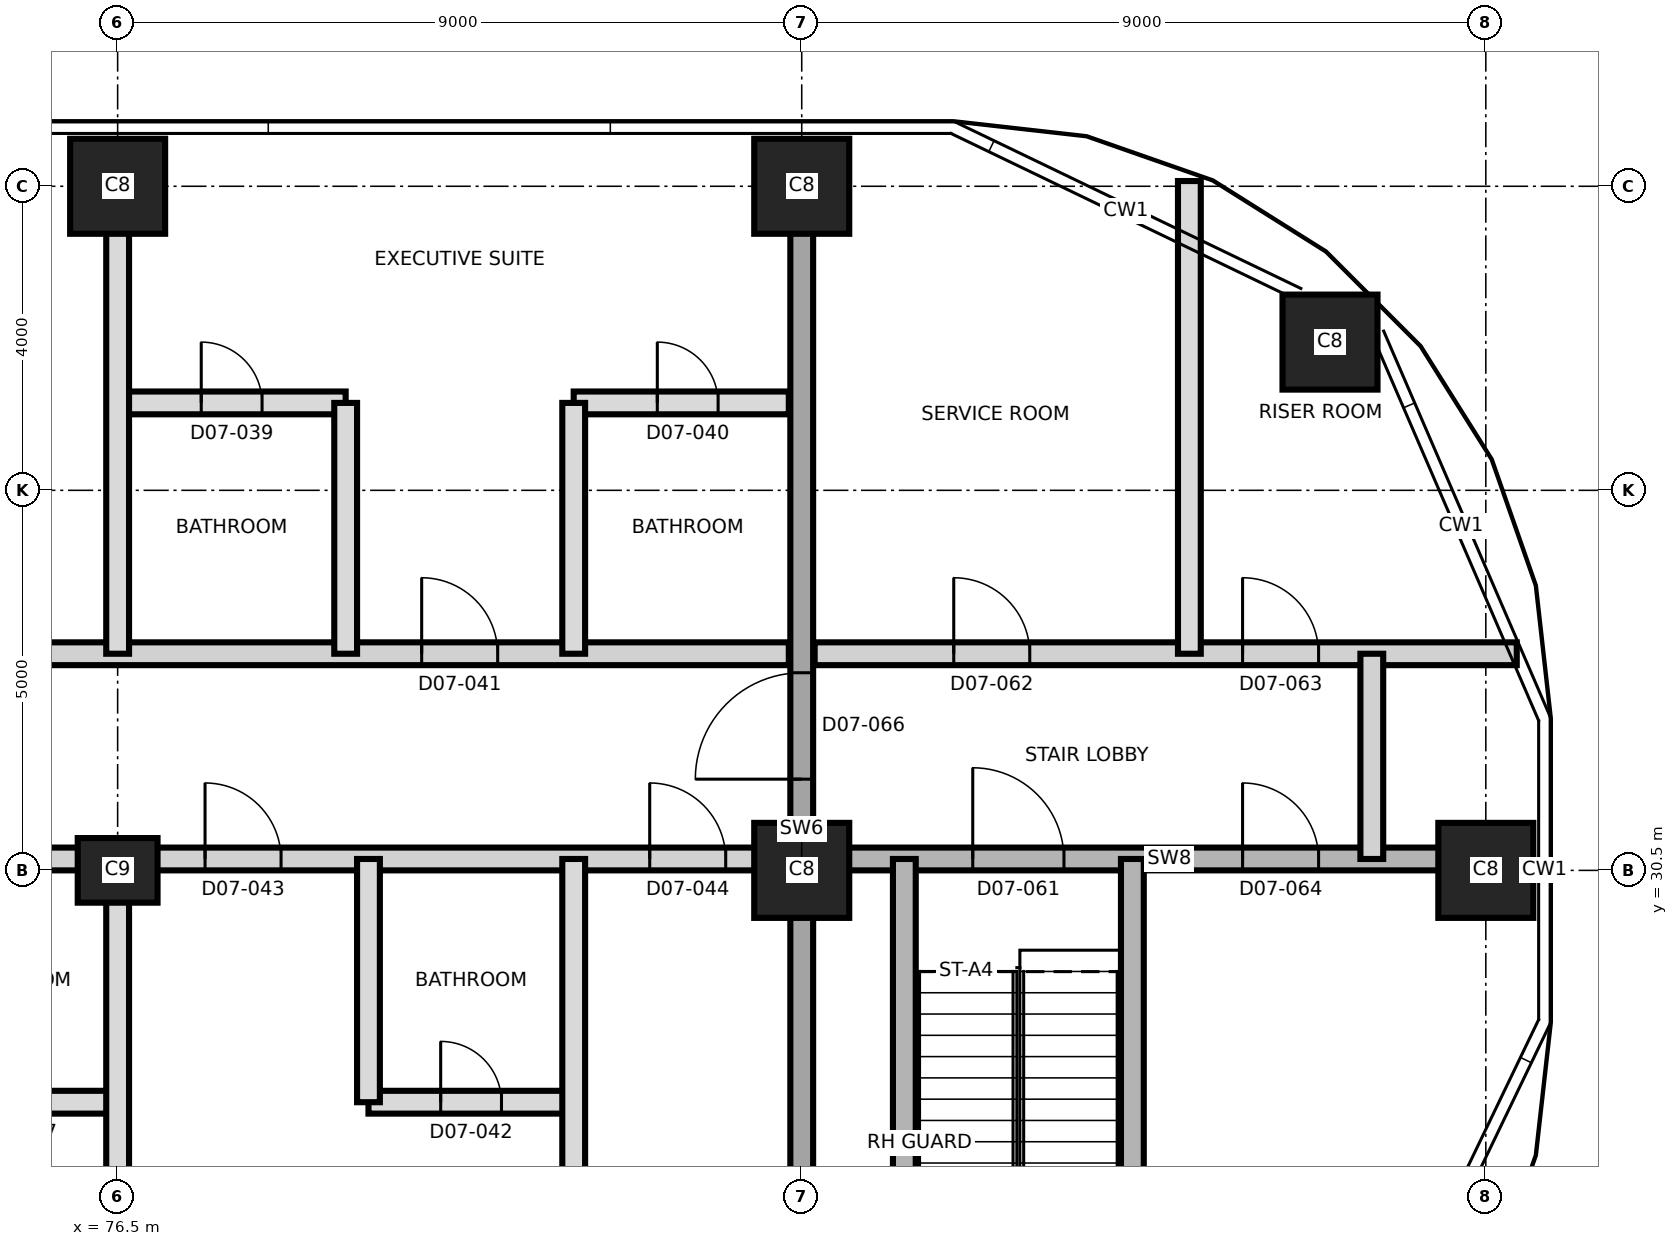
"""IFC4 building model, lengths in metres.
Left out: names, types, materials, properties, quantities, classifications, styles, units other than length and angle.
Written with IfcOpenShell. Run it as: python <this file> out.ifc"""

import sys

from ifc_helpers import new_model, si_unit, direction, frame, frame_2d, origin, origin_2d, place, context, subcontext, project, spatial, rectangle, extrude, element, fill, save


model = new_model("IFC4")
c1 = context("Model", 3, precision=1e-05, world=origin(), true_north=direction((0.0, 1.0)))
c2 = subcontext(c1, "Body", "Model", "MODEL_VIEW")
j1 = project(units=[si_unit("LENGTHUNIT", "METRE"), si_unit("PLANEANGLEUNIT", "RADIAN")], contexts=[c1])
p1 = place(None, origin())
s1 = spatial("IfcSite", under=j1, at=p1, CompositionType="ELEMENT")
p2 = place(p1, origin())
s2 = spatial("IfcBuilding", under=s1, at=p2, CompositionType="ELEMENT")
p3 = place(p2, frame((0.0, 0.0, 87.1)))
s3 = spatial("IfcBuildingStorey", under=s2, at=p3, CompositionType="ELEMENT", Elevation=87.1)
p4 = place(p3, frame((76.5, 30.5, 0.0), z_axis=(0.0, 0.0, 1.0), x_axis=(1.0, 0.0, 0.0)))
e1 = element("IfcColumn", 1, at=p4, inside=s3, PredefinedType="COLUMN", context=c2, shape_type="SweptSolid", body=[
    extrude(rectangle(XDim=1.05, YDim=0.85, at=origin_2d()), origin(), (0.0, 0.0, 1.0), 3.7),
])
for number, where, z_axis, x_axis in (
    (2, (85.5, 30.5, 0.0), (0.0, 0.0, 1.0), (1.0, 0.0, 0.0)),
    (3, (94.5, 30.5, 0.0), (0.0, 0.0, 1.0), (1.0, 0.0, 0.0)),
    (4, (92.45, 37.45, 0.0), (0.0, 0.0, 1.0), (1.0, 0.0, 0.0)),
    (5, (76.5, 39.5, 0.0), (0.0, 0.0, 1.0), (1.0, 0.0, 0.0)),
    (6, (85.5, 39.5, 0.0), (0.0, 0.0, 1.0), (1.0, 0.0, 0.0)),
):
    element("IfcColumn", number, at=place(p3, frame(where, z_axis=z_axis, x_axis=x_axis)), inside=s3, PredefinedType="COLUMN", context=c2, shape_type="SweptSolid", body=[
        extrude(rectangle(XDim=1.25, YDim=1.25, at=origin_2d()), origin(), (0.0, 0.0, 1.0), 3.7),
    ])
p5 = place(p3, frame((85.5, 20.995, 0.0), z_axis=(0.0, 0.0, 1.0), x_axis=(0.0, 1.0, 0.0)))
e7 = element("IfcWall", 7, at=p5, inside=s3, PredefinedType="SHEAR", context=c2, shape_type="SweptSolid", body=[
    extrude(rectangle(XDim=19.01, YDim=0.3, at=frame_2d((9.505, 0.0))), origin(), (0.0, 0.0, 1.0), 3.7),
])
p6 = place(p5, frame((10.705, 0.0, 0.0)))
e8 = element("IfcOpeningElement", 8, at=p6, cuts=e7, PredefinedType="OPENING", context=c2, shape_type="SweptSolid", body=[
    extrude(rectangle(XDim=1.4, YDim=2.1, at=frame_2d((0.7, 1.05))), frame((0.0, 0.16, 0.0), z_axis=(0.0, -1.0, 0.0), x_axis=(1.0, 0.0, 0.0)), (0.0, 0.0, 1.0), 0.32),
])
p7 = place(p3, frame((73.8, 27.45, 0.0), z_axis=(0.0, 0.0, 1.0), x_axis=(1.0, 0.0, 0.0)))
e9 = element("IfcWall", 9, at=p7, inside=s3, PredefinedType="PARTITIONING", context=c2, shape_type="SweptSolid", body=[
    extrude(rectangle(XDim=2.7, YDim=0.3, at=frame_2d((1.35, 0.0))), origin(), (0.0, 0.0, 1.0), 3.4),
])
p8 = place(p7, frame((0.95, 0.0, 0.0)))
e10 = element("IfcOpeningElement", 10, at=p8, cuts=e9, PredefinedType="OPENING", context=c2, shape_type="SweptSolid", body=[
    extrude(rectangle(XDim=0.8, YDim=2.1, at=frame_2d((0.4, 1.05))), frame((0.0, 0.16, 0.0), z_axis=(0.0, -1.0, 0.0), x_axis=(1.0, 0.0, 0.0)), (0.0, 0.0, 1.0), 0.32),
])
p9 = place(p3, frame((79.8, 27.45, 0.0), z_axis=(0.0, 0.0, 1.0), x_axis=(1.0, 0.0, 0.0)))
e11 = element("IfcWall", 11, at=p9, inside=s3, PredefinedType="PARTITIONING", context=c2, shape_type="SweptSolid", body=[
    extrude(rectangle(XDim=2.7, YDim=0.3, at=frame_2d((1.35, 0.0))), origin(), (0.0, 0.0, 1.0), 3.4),
])
p10 = place(p9, frame((0.95, 0.0, 0.0)))
e12 = element("IfcOpeningElement", 12, at=p10, cuts=e11, PredefinedType="OPENING", context=c2, shape_type="SweptSolid", body=[
    extrude(rectangle(XDim=0.8, YDim=2.1, at=frame_2d((0.4, 1.05))), frame((0.0, 0.16, 0.0), z_axis=(0.0, -1.0, 0.0), x_axis=(1.0, 0.0, 0.0)), (0.0, 0.0, 1.0), 0.32),
])
p11 = place(p3, frame((58.8, 30.65, 0.0), z_axis=(0.0, 0.0, 1.0), x_axis=(1.0, 0.0, 0.0)))
e13 = element("IfcWall", 13, at=p11, inside=s3, PredefinedType="PARTITIONING", context=c2, shape_type="SweptSolid", body=[
    extrude(rectangle(XDim=26.53, YDim=0.3, at=frame_2d((13.265, 0.0))), origin(), (0.0, 0.0, 1.0), 3.4),
])
p12 = place(p11, frame((3.7, 0.0, 0.0)))
e14 = element("IfcOpeningElement", 14, at=p12, cuts=e13, PredefinedType="OPENING", context=c2, shape_type="SweptSolid", body=[
    extrude(rectangle(XDim=1.0, YDim=2.4, at=frame_2d((0.5, 1.2))), frame((0.0, 0.16, 0.0), z_axis=(0.0, -1.0, 0.0), x_axis=(1.0, 0.0, 0.0)), (0.0, 0.0, 1.0), 0.32),
])
p13 = place(p11, frame((11.8, 0.0, 0.0)))
e15 = element("IfcOpeningElement", 15, at=p13, cuts=e13, PredefinedType="OPENING", context=c2, shape_type="SweptSolid", body=[
    extrude(rectangle(XDim=1.0, YDim=2.1, at=frame_2d((0.5, 1.05))), frame((0.0, 0.16, 0.0), z_axis=(0.0, -1.0, 0.0), x_axis=(1.0, 0.0, 0.0)), (0.0, 0.0, 1.0), 0.32),
])
p14 = place(p11, frame((13.6, 0.0, 0.0)))
e16 = element("IfcOpeningElement", 16, at=p14, cuts=e13, PredefinedType="OPENING", context=c2, shape_type="SweptSolid", body=[
    extrude(rectangle(XDim=1.0, YDim=2.1, at=frame_2d((0.5, 1.05))), frame((0.0, 0.16, 0.0), z_axis=(0.0, -1.0, 0.0), x_axis=(1.0, 0.0, 0.0)), (0.0, 0.0, 1.0), 0.32),
])
p15 = place(p11, frame((18.85, 0.0, 0.0)))
e17 = element("IfcOpeningElement", 17, at=p15, cuts=e13, PredefinedType="OPENING", context=c2, shape_type="SweptSolid", body=[
    extrude(rectangle(XDim=1.0, YDim=2.1, at=frame_2d((0.5, 1.05))), frame((0.0, 0.16, 0.0), z_axis=(0.0, -1.0, 0.0), x_axis=(1.0, 0.0, 0.0)), (0.0, 0.0, 1.0), 0.32),
])
p16 = place(p11, frame((24.7, 0.0, 0.0)))
e18 = element("IfcOpeningElement", 18, at=p16, cuts=e13, PredefinedType="OPENING", context=c2, shape_type="SweptSolid", body=[
    extrude(rectangle(XDim=1.0, YDim=2.1, at=frame_2d((0.5, 1.05))), frame((0.0, 0.16, 0.0), z_axis=(0.0, -1.0, 0.0), x_axis=(1.0, 0.0, 0.0)), (0.0, 0.0, 1.0), 0.32),
])
p17 = place(p3, frame((85.67, 30.65, 0.0), z_axis=(0.0, 0.0, 1.0), x_axis=(1.0, 0.0, 0.0)))
e19 = element("IfcWall", 19, at=p17, inside=s3, PredefinedType="SHEAR", context=c2, shape_type="SweptSolid", body=[
    extrude(rectangle(XDim=9.335, YDim=0.3, at=frame_2d((4.667, 0.0))), origin(), (0.0, 0.0, 1.0), 3.4),
])
p18 = place(p17, frame((2.08, 0.0, 0.0)))
e20 = element("IfcOpeningElement", 20, at=p18, cuts=e19, PredefinedType="OPENING", context=c2, shape_type="SweptSolid", body=[
    extrude(rectangle(XDim=1.2, YDim=2.1, at=frame_2d((0.6, 1.05))), frame((0.0, 0.16, 0.0), z_axis=(0.0, -1.0, 0.0), x_axis=(1.0, 0.0, 0.0)), (0.0, 0.0, 1.0), 0.32),
])
p19 = place(p17, frame((5.63, 0.0, 0.0)))
e21 = element("IfcOpeningElement", 21, at=p19, cuts=e19, PredefinedType="OPENING", context=c2, shape_type="SweptSolid", body=[
    extrude(rectangle(XDim=1.0, YDim=2.1, at=frame_2d((0.5, 1.05))), frame((0.0, 0.16, 0.0), z_axis=(0.0, -1.0, 0.0), x_axis=(1.0, 0.0, 0.0)), (0.0, 0.0, 1.0), 0.32),
])
p20 = place(p3, frame((58.8, 33.35, 0.0), z_axis=(0.0, 0.0, 1.0), x_axis=(1.0, 0.0, 0.0)))
e22 = element("IfcWall", 22, at=p20, inside=s3, PredefinedType="PARTITIONING", context=c2, shape_type="SweptSolid", body=[
    extrude(rectangle(XDim=26.53, YDim=0.3, at=frame_2d((13.265, 0.0))), origin(), (0.0, 0.0, 1.0), 3.4),
])
p21 = place(p20, frame((3.7, 0.0, 0.0)))
e23 = element("IfcOpeningElement", 23, at=p21, cuts=e22, PredefinedType="OPENING", context=c2, shape_type="SweptSolid", body=[
    extrude(rectangle(XDim=1.0, YDim=2.4, at=frame_2d((0.5, 1.2))), frame((0.0, 0.16, 0.0), z_axis=(0.0, -1.0, 0.0), x_axis=(1.0, 0.0, 0.0)), (0.0, 0.0, 1.0), 0.32),
])
p22 = place(p20, frame((9.85, 0.0, 0.0)))
e24 = element("IfcOpeningElement", 24, at=p22, cuts=e22, PredefinedType="OPENING", context=c2, shape_type="SweptSolid", body=[
    extrude(rectangle(XDim=1.0, YDim=2.1, at=frame_2d((0.5, 1.05))), frame((0.0, 0.16, 0.0), z_axis=(0.0, -1.0, 0.0), x_axis=(1.0, 0.0, 0.0)), (0.0, 0.0, 1.0), 0.32),
])
p23 = place(p20, frame((15.7, 0.0, 0.0)))
e25 = element("IfcOpeningElement", 25, at=p23, cuts=e22, PredefinedType="OPENING", context=c2, shape_type="SweptSolid", body=[
    extrude(rectangle(XDim=1.0, YDim=2.1, at=frame_2d((0.5, 1.05))), frame((0.0, 0.16, 0.0), z_axis=(0.0, -1.0, 0.0), x_axis=(1.0, 0.0, 0.0)), (0.0, 0.0, 1.0), 0.32),
])
p24 = place(p20, frame((21.7, 0.0, 0.0)))
e26 = element("IfcOpeningElement", 26, at=p24, cuts=e22, PredefinedType="OPENING", context=c2, shape_type="SweptSolid", body=[
    extrude(rectangle(XDim=1.0, YDim=2.4, at=frame_2d((0.5, 1.2))), frame((0.0, 0.16, 0.0), z_axis=(0.0, -1.0, 0.0), x_axis=(1.0, 0.0, 0.0)), (0.0, 0.0, 1.0), 0.32),
])
p25 = place(p3, frame((85.67, 33.35, 0.0), z_axis=(0.0, 0.0, 1.0), x_axis=(1.0, 0.0, 0.0)))
e27 = element("IfcWall", 27, at=p25, inside=s3, PredefinedType="PARTITIONING", context=c2, shape_type="SweptSolid", body=[
    extrude(rectangle(XDim=9.237, YDim=0.3, at=frame_2d((4.619, 0.0))), origin(), (0.0, 0.0, 1.0), 3.4),
])
p26 = place(p25, frame((1.83, 0.0, 0.0)))
e28 = element("IfcOpeningElement", 28, at=p26, cuts=e27, PredefinedType="OPENING", context=c2, shape_type="SweptSolid", body=[
    extrude(rectangle(XDim=1.0, YDim=2.1, at=frame_2d((0.5, 1.05))), frame((0.0, 0.16, 0.0), z_axis=(0.0, -1.0, 0.0), x_axis=(1.0, 0.0, 0.0)), (0.0, 0.0, 1.0), 0.32),
])
p27 = place(p25, frame((5.63, 0.0, 0.0)))
e29 = element("IfcOpeningElement", 29, at=p27, cuts=e27, PredefinedType="OPENING", context=c2, shape_type="SweptSolid", body=[
    extrude(rectangle(XDim=1.0, YDim=2.1, at=frame_2d((0.5, 1.05))), frame((0.0, 0.16, 0.0), z_axis=(0.0, -1.0, 0.0), x_axis=(1.0, 0.0, 0.0)), (0.0, 0.0, 1.0), 0.32),
])
p28 = place(p3, frame((76.5, 36.65, 0.0), z_axis=(0.0, 0.0, 1.0), x_axis=(1.0, 0.0, 0.0)))
e30 = element("IfcWall", 30, at=p28, inside=s3, PredefinedType="PARTITIONING", context=c2, shape_type="SweptSolid", body=[
    extrude(rectangle(XDim=3.0, YDim=0.3, at=frame_2d((1.5, 0.0))), origin(), (0.0, 0.0, 1.0), 3.4),
])
p29 = place(p28, frame((1.1, 0.0, 0.0)))
e31 = element("IfcOpeningElement", 31, at=p29, cuts=e30, PredefinedType="OPENING", context=c2, shape_type="SweptSolid", body=[
    extrude(rectangle(XDim=0.8, YDim=2.1, at=frame_2d((0.4, 1.05))), frame((0.0, 0.16, 0.0), z_axis=(0.0, -1.0, 0.0), x_axis=(1.0, 0.0, 0.0)), (0.0, 0.0, 1.0), 0.32),
])
p30 = place(p3, frame((82.5, 36.65, 0.0), z_axis=(0.0, 0.0, 1.0), x_axis=(1.0, 0.0, 0.0)))
e32 = element("IfcWall", 32, at=p30, inside=s3, PredefinedType="PARTITIONING", context=c2, shape_type="SweptSolid", body=[
    extrude(rectangle(XDim=2.83, YDim=0.3, at=frame_2d((1.415, 0.0))), origin(), (0.0, 0.0, 1.0), 3.4),
])
p31 = place(p30, frame((1.1, 0.0, 0.0)))
e33 = element("IfcOpeningElement", 33, at=p31, cuts=e32, PredefinedType="OPENING", context=c2, shape_type="SweptSolid", body=[
    extrude(rectangle(XDim=0.8, YDim=2.1, at=frame_2d((0.4, 1.05))), frame((0.0, 0.16, 0.0), z_axis=(0.0, -1.0, 0.0), x_axis=(1.0, 0.0, 0.0)), (0.0, 0.0, 1.0), 0.32),
])
p32 = place(p3, frame((76.5, 20.995, 0.0), z_axis=(0.0, 0.0, 1.0), x_axis=(0.0, 1.0, 0.0)))
e34 = element("IfcWall", 34, at=p32, inside=s3, PredefinedType="PARTITIONING", context=c2, shape_type="SweptSolid", body=[
    extrude(rectangle(XDim=9.655, YDim=0.3, at=frame_2d((4.827, 0.0))), origin(), (0.0, 0.0, 1.0), 3.4),
])
p33 = place(p3, frame((76.5, 33.35, 0.0), z_axis=(0.0, 0.0, 1.0), x_axis=(0.0, 1.0, 0.0)))
e35 = element("IfcWall", 35, at=p33, inside=s3, PredefinedType="PARTITIONING", context=c2, shape_type="SweptSolid", body=[
    extrude(rectangle(XDim=6.655, YDim=0.3, at=frame_2d((3.327, 0.0))), origin(), (0.0, 0.0, 1.0), 3.4),
])
p34 = place(p3, frame((79.5, 33.35, 0.0), z_axis=(0.0, 0.0, 1.0), x_axis=(0.0, 1.0, 0.0)))
e36 = element("IfcWall", 36, at=p34, inside=s3, PredefinedType="PARTITIONING", context=c2, shape_type="SweptSolid", body=[
    extrude(rectangle(XDim=3.3, YDim=0.3, at=frame_2d((1.65, 0.0))), origin(), (0.0, 0.0, 1.0), 3.4),
])
p35 = place(p3, frame((79.8, 27.45, 0.0), z_axis=(0.0, 0.0, 1.0), x_axis=(0.0, 1.0, 0.0)))
e37 = element("IfcWall", 37, at=p35, inside=s3, PredefinedType="PARTITIONING", context=c2, shape_type="SweptSolid", body=[
    extrude(rectangle(XDim=3.2, YDim=0.3, at=frame_2d((1.6, 0.0))), origin(), (0.0, 0.0, 1.0), 3.4),
])
p36 = place(p3, frame((82.5, 20.995, 0.0), z_axis=(0.0, 0.0, 1.0), x_axis=(0.0, 1.0, 0.0)))
e38 = element("IfcWall", 38, at=p36, inside=s3, PredefinedType="PARTITIONING", context=c2, shape_type="SweptSolid", body=[
    extrude(rectangle(XDim=9.655, YDim=0.3, at=frame_2d((4.827, 0.0))), origin(), (0.0, 0.0, 1.0), 3.4),
])
p37 = place(p3, frame((82.5, 33.35, 0.0), z_axis=(0.0, 0.0, 1.0), x_axis=(0.0, 1.0, 0.0)))
e39 = element("IfcWall", 39, at=p37, inside=s3, PredefinedType="PARTITIONING", context=c2, shape_type="SweptSolid", body=[
    extrude(rectangle(XDim=3.3, YDim=0.3, at=frame_2d((1.65, 0.0))), origin(), (0.0, 0.0, 1.0), 3.4),
])
for number, where, z_axis, x_axis in (
    (40, (86.85, 21.8, 0.0), (0.0, 0.0, 1.0), (0.0, 1.0, 0.0)),
    (41, (89.85, 21.8, 0.0), (0.0, 0.0, 1.0), (0.0, 1.0, 0.0)),
):
    element("IfcWall", number, at=place(p3, frame(where, z_axis=z_axis, x_axis=x_axis)), inside=s3, PredefinedType="SHEAR", context=c2, shape_type="SweptSolid", body=[
        extrude(rectangle(XDim=8.85, YDim=0.3, at=frame_2d((4.425, 0.0))), origin(), (0.0, 0.0, 1.0), 3.4),
    ])
p38 = place(p3, frame((90.6, 33.35, 0.0), z_axis=(0.0, 0.0, 1.0), x_axis=(0.0, 1.0, 0.0)))
e42 = element("IfcWall", 42, at=p38, inside=s3, PredefinedType="PARTITIONING", context=c2, shape_type="SweptSolid", body=[
    extrude(rectangle(XDim=6.219, YDim=0.3, at=frame_2d((3.109, 0.0))), origin(), (0.0, 0.0, 1.0), 3.4),
])
p39 = place(p3, frame((93.0, 30.65, 0.0), z_axis=(0.0, 0.0, 1.0), x_axis=(0.0, 1.0, 0.0)))
e43 = element("IfcWall", 43, at=p39, inside=s3, PredefinedType="PARTITIONING", context=c2, shape_type="SweptSolid", body=[
    extrude(rectangle(XDim=2.7, YDim=0.3, at=frame_2d((1.35, 0.0))), origin(), (0.0, 0.0, 1.0), 3.4),
])
p40 = place(p29, origin())
e44 = element("IfcDoor", 44, at=p40, inside=s3, OperationType="SINGLE_SWING_RIGHT", PredefinedType="DOOR", context=c2, shape_type="SweptSolid", body=[
    extrude(rectangle(XDim=0.8, YDim=2.1, at=frame_2d((0.4, 1.05))), frame((0.0, 0.025, 0.0), z_axis=(0.0, -1.0, 0.0), x_axis=(1.0, 0.0, 0.0)), (0.0, 0.0, 1.0), 0.05),
])
fill(e31, e44)
p41 = place(p31, origin())
e45 = element("IfcDoor", 45, at=p41, inside=s3, OperationType="SINGLE_SWING_LEFT", PredefinedType="DOOR", context=c2, shape_type="SweptSolid", body=[
    extrude(rectangle(XDim=0.8, YDim=2.1, at=frame_2d((0.4, 1.05))), frame((0.0, 0.025, 0.0), z_axis=(0.0, -1.0, 0.0), x_axis=(1.0, 0.0, 0.0)), (0.0, 0.0, 1.0), 0.05),
])
fill(e33, e45)
p42 = place(p24, origin())
e46 = element("IfcDoor", 46, at=p42, inside=s3, OperationType="SINGLE_SWING_LEFT", PredefinedType="DOOR", context=c2, shape_type="SweptSolid", body=[
    extrude(rectangle(XDim=1.0, YDim=2.4, at=frame_2d((0.5, 1.2))), frame((0.0, 0.025, 0.0), z_axis=(0.0, -1.0, 0.0), x_axis=(1.0, 0.0, 0.0)), (0.0, 0.0, 1.0), 0.05),
])
fill(e26, e46)
p43 = place(p10, origin())
e47 = element("IfcDoor", 47, at=p43, inside=s3, OperationType="SINGLE_SWING_RIGHT", PredefinedType="DOOR", context=c2, shape_type="SweptSolid", body=[
    extrude(rectangle(XDim=0.8, YDim=2.1, at=frame_2d((0.4, 1.05))), frame((0.0, 0.025, 0.0), z_axis=(0.0, -1.0, 0.0), x_axis=(1.0, 0.0, 0.0)), (0.0, 0.0, 1.0), 0.05),
])
fill(e12, e47)
p44 = place(p15, origin())
e48 = element("IfcDoor", 48, at=p44, inside=s3, OperationType="SINGLE_SWING_LEFT", PredefinedType="DOOR", context=c2, shape_type="SweptSolid", body=[
    extrude(rectangle(XDim=1.0, YDim=2.1, at=frame_2d((0.5, 1.05))), frame((0.0, 0.025, 0.0), z_axis=(0.0, -1.0, 0.0), x_axis=(1.0, 0.0, 0.0)), (0.0, 0.0, 1.0), 0.05),
])
fill(e17, e48)
p45 = place(p16, origin())
e49 = element("IfcDoor", 49, at=p45, inside=s3, OperationType="SINGLE_SWING_LEFT", PredefinedType="DOOR", context=c2, shape_type="SweptSolid", body=[
    extrude(rectangle(XDim=1.0, YDim=2.1, at=frame_2d((0.5, 1.05))), frame((0.0, 0.025, 0.0), z_axis=(0.0, -1.0, 0.0), x_axis=(1.0, 0.0, 0.0)), (0.0, 0.0, 1.0), 0.05),
])
fill(e18, e49)
p46 = place(p18, origin())
e50 = element("IfcDoor", 50, at=p46, inside=s3, OperationType="SINGLE_SWING_LEFT", PredefinedType="DOOR", context=c2, shape_type="SweptSolid", body=[
    extrude(rectangle(XDim=1.2, YDim=2.1, at=frame_2d((0.6, 1.05))), frame((0.0, 0.025, 0.0), z_axis=(0.0, -1.0, 0.0), x_axis=(1.0, 0.0, 0.0)), (0.0, 0.0, 1.0), 0.05),
])
fill(e20, e50)
p47 = place(p26, origin())
e51 = element("IfcDoor", 51, at=p47, inside=s3, OperationType="SINGLE_SWING_LEFT", PredefinedType="DOOR", context=c2, shape_type="SweptSolid", body=[
    extrude(rectangle(XDim=1.0, YDim=2.1, at=frame_2d((0.5, 1.05))), frame((0.0, 0.025, 0.0), z_axis=(0.0, -1.0, 0.0), x_axis=(1.0, 0.0, 0.0)), (0.0, 0.0, 1.0), 0.05),
])
fill(e28, e51)
p48 = place(p27, origin())
e52 = element("IfcDoor", 52, at=p48, inside=s3, OperationType="SINGLE_SWING_RIGHT", PredefinedType="DOOR", context=c2, shape_type="SweptSolid", body=[
    extrude(rectangle(XDim=1.0, YDim=2.1, at=frame_2d((0.5, 1.05))), frame((0.0, 0.025, 0.0), z_axis=(0.0, -1.0, 0.0), x_axis=(1.0, 0.0, 0.0)), (0.0, 0.0, 1.0), 0.05),
])
fill(e29, e52)
p49 = place(p19, origin())
e53 = element("IfcDoor", 53, at=p49, inside=s3, OperationType="SINGLE_SWING_LEFT", PredefinedType="DOOR", context=c2, shape_type="SweptSolid", body=[
    extrude(rectangle(XDim=1.0, YDim=2.1, at=frame_2d((0.5, 1.05))), frame((0.0, 0.025, 0.0), z_axis=(0.0, -1.0, 0.0), x_axis=(1.0, 0.0, 0.0)), (0.0, 0.0, 1.0), 0.05),
])
fill(e21, e53)
p50 = place(p6, origin())
e54 = element("IfcDoor", 54, at=p50, inside=s3, OperationType="SINGLE_SWING_RIGHT", PredefinedType="DOOR", context=c2, shape_type="SweptSolid", body=[
    extrude(rectangle(XDim=1.4, YDim=2.1, at=frame_2d((0.7, 1.05))), frame((0.0, 0.025, 0.0), z_axis=(0.0, -1.0, 0.0), x_axis=(1.0, 0.0, 0.0)), (0.0, 0.0, 1.0), 0.05),
])
fill(e8, e54)
save(model, sys.argv[1])
